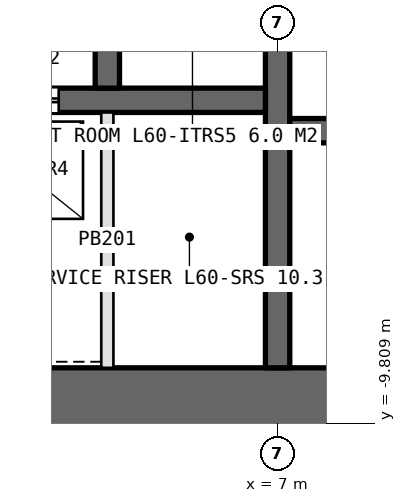
"""IFC4 building model, lengths in metres.
Left out: names, types, materials, properties, quantities, classifications, styles, units other than length and angle.
Written with IfcOpenShell. Run it as: python <this file> out.ifc"""

import sys

from ifc_helpers import new_model, si_unit, direction, frame, frame_2d, origin, place, context, subcontext, project, spatial, rectangle, extrude, element, fill, save


model = new_model("IFC4")
c1 = context("Model", 3, precision=1e-05, world=origin(), true_north=direction((0.0, 1.0)))
c2 = subcontext(c1, "Body", "Model", "MODEL_VIEW")
j1 = project(units=[si_unit("LENGTHUNIT", "METRE"), si_unit("PLANEANGLEUNIT", "RADIAN")], contexts=[c1])
p1 = place(None, origin())
s1 = spatial("IfcSite", under=j1, at=p1, CompositionType="ELEMENT")
p2 = place(p1, origin())
s2 = spatial("IfcBuilding", under=s1, at=p2, CompositionType="ELEMENT")
p3 = place(p2, frame((0.0, 0.0, 271.2)))
s3 = spatial("IfcBuildingStorey", under=s2, at=p3, CompositionType="ELEMENT", Elevation=271.2)
p4 = place(p3, frame((-13.9, -9.4, 0.0), z_axis=(0.0, 0.0, 1.0), x_axis=(1.0, 0.0, 0.0)))
e1 = element("IfcWall", 1, at=p4, inside=s3, PredefinedType="SHEAR", context=c2, shape_type="SweptSolid", body=[
    extrude(rectangle(XDim=27.8, YDim=1.0, at=frame_2d((13.9, 0.0))), origin(), (0.0, 0.0, 1.0), 4.2),
])
p5 = place(p4, frame((22.95, 0.0, 0.0)))
e2 = element("IfcOpeningElement", 2, at=p5, cuts=e1, PredefinedType="OPENING", context=c2, shape_type="SweptSolid", body=[
    extrude(rectangle(XDim=2.2, YDim=2.7, at=frame_2d((1.1, 1.35))), frame((0.0, 0.51, 0.0), z_axis=(0.0, -1.0, 0.0), x_axis=(1.0, 0.0, 0.0)), (0.0, 0.0, 1.0), 1.02),
])
p6 = place(p3, frame((7.0, -8.9, 0.0), z_axis=(0.0, 0.0, 1.0), x_axis=(0.0, 1.0, 0.0)))
e3 = element("IfcWall", 3, at=p6, inside=s3, PredefinedType="SHEAR", context=c2, shape_type="SweptSolid", body=[
    extrude(rectangle(XDim=17.8, YDim=0.4, at=frame_2d((8.9, 0.0))), origin(), (0.0, 0.0, 1.0), 4.2),
])
p7 = place(p6, frame((8.0, 0.0, 0.0)))
e4 = element("IfcOpeningElement", 4, at=p7, cuts=e3, PredefinedType="OPENING", context=c2, shape_type="SweptSolid", body=[
    extrude(rectangle(XDim=1.8, YDim=2.4, at=frame_2d((0.9, 1.2))), frame((0.0, 0.21, 0.0), z_axis=(0.0, -1.0, 0.0), x_axis=(1.0, 0.0, 0.0)), (0.0, 0.0, 1.0), 0.42),
])
p8 = place(p3, frame((-6.8, -4.5, 0.0), z_axis=(0.0, 0.0, 1.0), x_axis=(1.0, 0.0, 0.0)))
e5 = element("IfcWall", 5, at=p8, inside=s3, PredefinedType="SHEAR", context=c2, shape_type="SweptSolid", body=[
    extrude(rectangle(XDim=13.6, YDim=0.4, at=frame_2d((6.8, 0.0))), origin(), (0.0, 0.0, 1.0), 4.2),
])
p9 = place(p8, frame((0.7, 0.0, 0.0)))
e6 = element("IfcOpeningElement", 6, at=p9, cuts=e5, PredefinedType="OPENING", context=c2, shape_type="SweptSolid", body=[
    extrude(rectangle(XDim=1.1, YDim=2.4, at=frame_2d((0.55, 1.2))), frame((0.0, 0.21, 0.0), z_axis=(0.0, -1.0, 0.0), x_axis=(1.0, 0.0, 0.0)), (0.0, 0.0, 1.0), 0.42),
])
p10 = place(p8, frame((3.5, 0.0, 0.0)))
e7 = element("IfcOpeningElement", 7, at=p10, cuts=e5, PredefinedType="OPENING", context=c2, shape_type="SweptSolid", body=[
    extrude(rectangle(XDim=1.1, YDim=2.4, at=frame_2d((0.55, 1.2))), frame((0.0, 0.21, 0.0), z_axis=(0.0, -1.0, 0.0), x_axis=(1.0, 0.0, 0.0)), (0.0, 0.0, 1.0), 0.42),
])
p11 = place(p8, frame((6.3, 0.0, 0.0)))
e8 = element("IfcOpeningElement", 8, at=p11, cuts=e5, PredefinedType="OPENING", context=c2, shape_type="SweptSolid", body=[
    extrude(rectangle(XDim=1.1, YDim=2.4, at=frame_2d((0.55, 1.2))), frame((0.0, 0.21, 0.0), z_axis=(0.0, -1.0, 0.0), x_axis=(1.0, 0.0, 0.0)), (0.0, 0.0, 1.0), 0.42),
])
p12 = place(p8, frame((9.1, 0.0, 0.0)))
e9 = element("IfcOpeningElement", 9, at=p12, cuts=e5, PredefinedType="OPENING", context=c2, shape_type="SweptSolid", body=[
    extrude(rectangle(XDim=1.1, YDim=2.4, at=frame_2d((0.55, 1.2))), frame((0.0, 0.21, 0.0), z_axis=(0.0, -1.0, 0.0), x_axis=(1.0, 0.0, 0.0)), (0.0, 0.0, 1.0), 0.42),
])
p13 = place(p3, frame((7.2, -5.0, 0.0), z_axis=(0.0, 0.0, 1.0), x_axis=(1.0, 0.0, 0.0)))
e10 = element("IfcWall", 10, at=p13, inside=s3, PredefinedType="SHEAR", context=c2, shape_type="SweptSolid", body=[
    extrude(rectangle(XDim=5.7, YDim=0.4, at=frame_2d((2.85, 0.0))), origin(), (0.0, 0.0, 1.0), 4.2),
])
p14 = place(p3, frame((4.2, -4.3, 0.0), z_axis=(0.0, 0.0, 1.0), x_axis=(0.0, 1.0, 0.0)))
e11 = element("IfcWall", 11, at=p14, inside=s3, PredefinedType="SHEAR", context=c2, shape_type="SweptSolid", body=[
    extrude(rectangle(XDim=2.5, YDim=0.4, at=frame_2d((1.25, 0.0))), origin(), (0.0, 0.0, 1.0), 4.2),
])
p15 = place(p3, frame((4.2, -4.7, 0.0), z_axis=(0.0, 0.0, 1.0), x_axis=(0.0, -1.0, 0.0)))
e12 = element("IfcWall", 12, at=p15, inside=s3, PredefinedType="PARTITIONING", context=c2, shape_type="SweptSolid", body=[
    extrude(rectangle(XDim=4.2, YDim=0.2, at=frame_2d((2.1, 0.0))), origin(), (0.0, 0.0, 1.0), 4.2),
])
p16 = place(p12, origin())
e13 = element("IfcDoor", 13, at=p16, inside=s3, OperationType="DOUBLE_DOOR_SLIDING", PredefinedType="DOOR", context=c2, shape_type="SweptSolid", body=[
    extrude(rectangle(XDim=1.1, YDim=2.4, at=frame_2d((0.55, 1.2))), frame((0.0, 0.025, 0.0), z_axis=(0.0, -1.0, 0.0), x_axis=(1.0, 0.0, 0.0)), (0.0, 0.0, 1.0), 0.05),
])
fill(e9, e13)
save(model, sys.argv[1])
